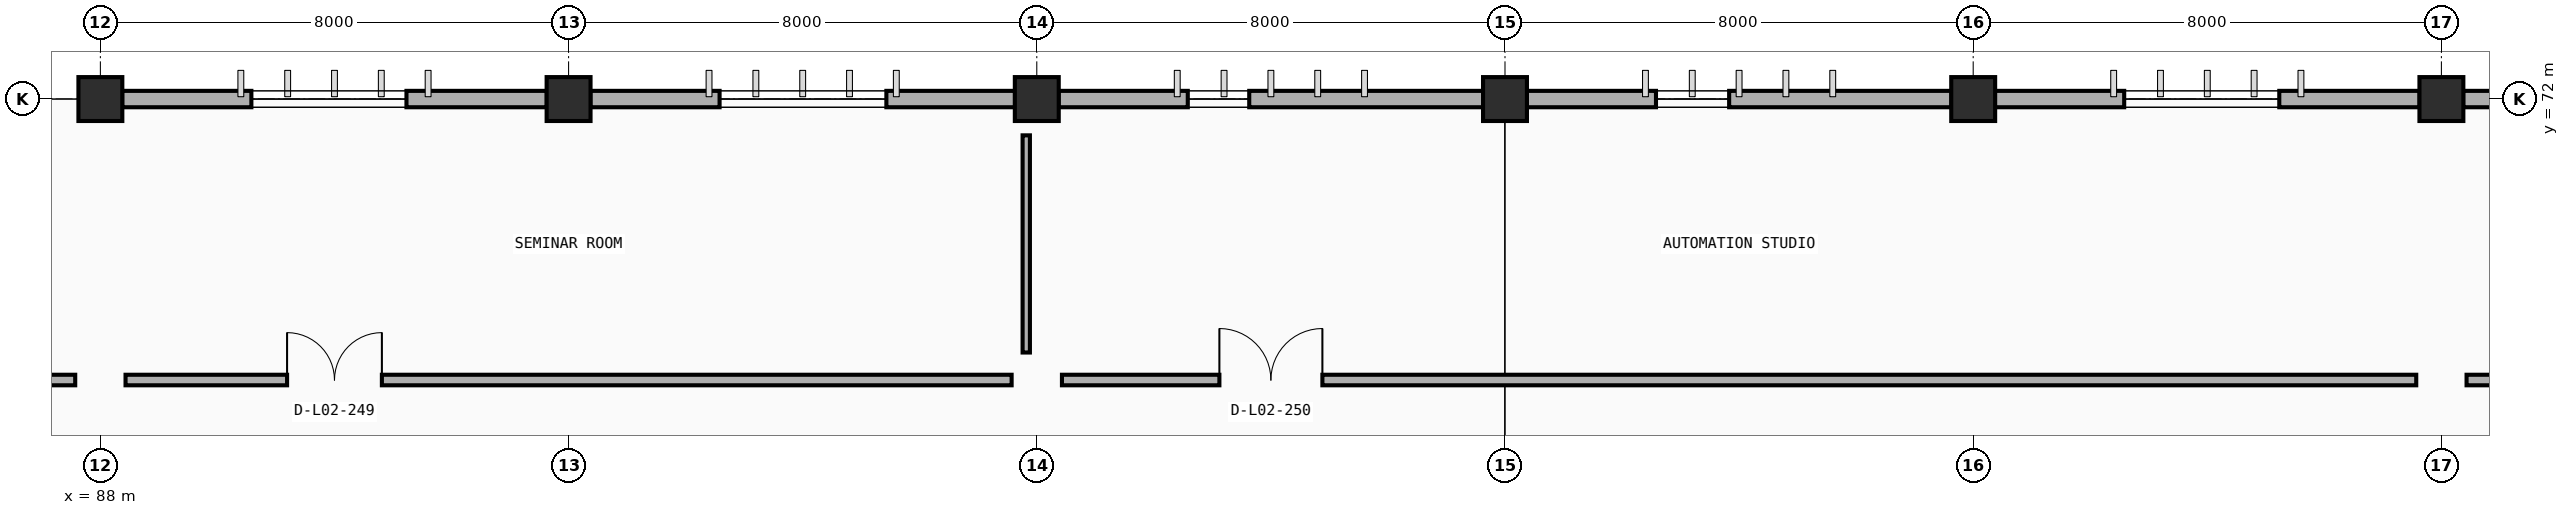
"""IFC4 building model, lengths in metres.
Left out: names, types, materials, properties, quantities, classifications, styles, units other than length and angle.
Written with IfcOpenShell. Run it as: python <this file> out.ifc"""

import sys

from ifc_helpers import new_model, si_unit, direction, frame, frame_2d, origin, origin_2d, place, context, subcontext, project, spatial, rectangle, extrude, element, fill, save


model = new_model("IFC4")
c1 = context("Model", 3, precision=1e-05, world=origin(), true_north=direction((0.0, 1.0)))
c2 = subcontext(c1, "Body", "Model", "MODEL_VIEW")
j1 = project(units=[si_unit("LENGTHUNIT", "METRE"), si_unit("PLANEANGLEUNIT", "RADIAN")], contexts=[c1])
p1 = place(None, origin())
s1 = spatial("IfcSite", under=j1, at=p1, CompositionType="ELEMENT")
p2 = place(p1, origin())
s2 = spatial("IfcBuilding", under=s1, at=p2, CompositionType="ELEMENT")
p3 = place(p2, frame((0.0, 0.0, 4.8)))
s3 = spatial("IfcBuildingStorey", under=s2, at=p3, CompositionType="ELEMENT", Elevation=4.8)
for number, where, z_axis, x_axis in (
    (1, (88.0, 72.0, 0.0), (0.0, 0.0, 1.0), (1.0, 0.0, 0.0)),
    (2, (96.0, 72.0, 0.0), (0.0, 0.0, 1.0), (1.0, 0.0, 0.0)),
    (3, (104.0, 72.0, 0.0), (0.0, 0.0, 1.0), (1.0, 0.0, 0.0)),
    (4, (112.0, 72.0, 0.0), (0.0, 0.0, 1.0), (1.0, 0.0, 0.0)),
    (5, (120.0, 72.0, 0.0), (0.0, 0.0, 1.0), (1.0, 0.0, 0.0)),
    (6, (128.0, 72.0, 0.0), (0.0, 0.0, 1.0), (1.0, 0.0, 0.0)),
):
    element("IfcColumn", number, at=place(p3, frame(where, z_axis=z_axis, x_axis=x_axis)), inside=s3, PredefinedType="COLUMN", context=c2, shape_type="SweptSolid", body=[
        extrude(rectangle(XDim=0.75, YDim=0.75, at=origin_2d()), origin(), (0.0, 0.0, 1.0), 4.8),
    ])
p4 = place(p3, frame((88.372, 72.0, 0.0), z_axis=(0.0, 0.0, 1.0), x_axis=(1.0, 0.0, 0.0)))
e7 = element("IfcWall", 7, at=p4, inside=s3, PredefinedType="STANDARD", context=c2, shape_type="SweptSolid", body=[
    extrude(rectangle(XDim=7.256, YDim=0.28, at=frame_2d((3.628, 0.0))), origin(), (0.0, 0.0, 1.0), 3.91),
])
p5 = place(p4, frame((2.208, 0.0, 0.9)))
e8 = element("IfcOpeningElement", 8, at=p5, cuts=e7, PredefinedType="OPENING", context=c2, shape_type="SweptSolid", body=[
    extrude(rectangle(XDim=2.65, YDim=1.85, at=frame_2d((1.325, 0.925))), frame((0.0, 0.15, 0.0), z_axis=(0.0, -1.0, 0.0), x_axis=(1.0, 0.0, 0.0)), (0.0, 0.0, 1.0), 0.3),
])
p6 = place(p3, frame((96.372, 72.0, 0.0), z_axis=(0.0, 0.0, 1.0), x_axis=(1.0, 0.0, 0.0)))
e9 = element("IfcWall", 9, at=p6, inside=s3, PredefinedType="STANDARD", context=c2, shape_type="SweptSolid", body=[
    extrude(rectangle(XDim=7.256, YDim=0.28, at=frame_2d((3.628, 0.0))), origin(), (0.0, 0.0, 1.0), 3.91),
])
p7 = place(p6, frame((2.208, 0.0, 0.9)))
e10 = element("IfcOpeningElement", 10, at=p7, cuts=e9, PredefinedType="OPENING", context=c2, shape_type="SweptSolid", body=[
    extrude(rectangle(XDim=2.85, YDim=1.85, at=frame_2d((1.425, 0.925))), frame((0.0, 0.15, 0.0), z_axis=(0.0, -1.0, 0.0), x_axis=(1.0, 0.0, 0.0)), (0.0, 0.0, 1.0), 0.3),
])
p8 = place(p3, frame((104.372, 72.0, 0.0), z_axis=(0.0, 0.0, 1.0), x_axis=(1.0, 0.0, 0.0)))
e11 = element("IfcWall", 11, at=p8, inside=s3, PredefinedType="STANDARD", context=c2, shape_type="SweptSolid", body=[
    extrude(rectangle(XDim=7.256, YDim=0.28, at=frame_2d((3.628, 0.0))), origin(), (0.0, 0.0, 1.0), 3.91),
])
p9 = place(p8, frame((2.208, 0.0, 0.9)))
e12 = element("IfcOpeningElement", 12, at=p9, cuts=e11, PredefinedType="OPENING", context=c2, shape_type="SweptSolid", body=[
    extrude(rectangle(XDim=1.05, YDim=2.0, at=frame_2d((0.525, 1.0))), frame((0.0, 0.15, 0.0), z_axis=(0.0, -1.0, 0.0), x_axis=(1.0, 0.0, 0.0)), (0.0, 0.0, 1.0), 0.3),
])
p10 = place(p3, frame((112.372, 72.0, 0.0), z_axis=(0.0, 0.0, 1.0), x_axis=(1.0, 0.0, 0.0)))
e13 = element("IfcWall", 13, at=p10, inside=s3, PredefinedType="STANDARD", context=c2, shape_type="SweptSolid", body=[
    extrude(rectangle(XDim=7.256, YDim=0.28, at=frame_2d((3.628, 0.0))), origin(), (0.0, 0.0, 1.0), 3.91),
])
p11 = place(p10, frame((2.208, 0.0, 0.9)))
e14 = element("IfcOpeningElement", 14, at=p11, cuts=e13, PredefinedType="OPENING", context=c2, shape_type="SweptSolid", body=[
    extrude(rectangle(XDim=1.25, YDim=2.0, at=frame_2d((0.625, 1.0))), frame((0.0, 0.15, 0.0), z_axis=(0.0, -1.0, 0.0), x_axis=(1.0, 0.0, 0.0)), (0.0, 0.0, 1.0), 0.3),
])
p12 = place(p3, frame((120.372, 72.0, 0.0), z_axis=(0.0, 0.0, 1.0), x_axis=(1.0, 0.0, 0.0)))
e15 = element("IfcWall", 15, at=p12, inside=s3, PredefinedType="STANDARD", context=c2, shape_type="SweptSolid", body=[
    extrude(rectangle(XDim=7.256, YDim=0.28, at=frame_2d((3.628, 0.0))), origin(), (0.0, 0.0, 1.0), 3.91),
])
p13 = place(p12, frame((2.208, 0.0, 0.9)))
e16 = element("IfcOpeningElement", 16, at=p13, cuts=e15, PredefinedType="OPENING", context=c2, shape_type="SweptSolid", body=[
    extrude(rectangle(XDim=2.65, YDim=1.85, at=frame_2d((1.325, 0.925))), frame((0.0, 0.15, 0.0), z_axis=(0.0, -1.0, 0.0), x_axis=(1.0, 0.0, 0.0)), (0.0, 0.0, 1.0), 0.3),
])
p14 = place(p3, frame((128.372, 72.0, 0.0), z_axis=(0.0, 0.0, 1.0), x_axis=(1.0, 0.0, 0.0)))
e17 = element("IfcWall", 17, at=p14, inside=s3, PredefinedType="STANDARD", context=c2, shape_type="SweptSolid", body=[
    extrude(rectangle(XDim=7.256, YDim=0.28, at=frame_2d((3.628, 0.0))), origin(), (0.0, 0.0, 1.0), 3.91),
])
p15 = place(p14, frame((2.208, 0.0, 0.9)))
e18 = element("IfcOpeningElement", 18, at=p15, cuts=e17, PredefinedType="OPENING", context=c2, shape_type="SweptSolid", body=[
    extrude(rectangle(XDim=2.85, YDim=1.85, at=frame_2d((1.425, 0.925))), frame((0.0, 0.15, 0.0), z_axis=(0.0, -1.0, 0.0), x_axis=(1.0, 0.0, 0.0)), (0.0, 0.0, 1.0), 0.3),
])
p16 = place(p3, frame((87.9, 72.22, 0.0), z_axis=(0.0, 0.0, 1.0), x_axis=(0.0, 1.0, 0.0)))
e19 = element("IfcWall", 19, at=p16, inside=s3, PredefinedType="PARAPET", context=c2, shape_type="SweptSolid", body=[
    extrude(rectangle(XDim=7.56, YDim=0.2, at=frame_2d((3.78, 0.0))), origin(), (0.0, 0.0, 1.0), 1.15),
])
p17 = place(p3, frame((56.43, 67.2, 0.0), z_axis=(0.0, 0.0, 1.0), x_axis=(1.0, 0.0, 0.0)))
e20 = element("IfcWall", 20, at=p17, inside=s3, PredefinedType="PARTITIONING", context=c2, shape_type="SweptSolid", body=[
    extrude(rectangle(XDim=31.14, YDim=0.18, at=frame_2d((15.57, 0.0))), origin(), (0.0, 0.0, 1.0), 3.9),
])
p18 = place(p17, frame((2.96, 0.0, 0.0)))
e21 = element("IfcOpeningElement", 21, at=p18, cuts=e20, PredefinedType="OPENING", context=c2, shape_type="SweptSolid", body=[
    extrude(rectangle(XDim=1.22, YDim=2.18, at=frame_2d((0.61, 1.09))), frame((0.0, 0.1, 0.0), z_axis=(0.0, -1.0, 0.0), x_axis=(1.0, 0.0, 0.0)), (0.0, 0.0, 1.0), 0.2),
])
p19 = place(p3, frame((88.43, 67.2, 0.0), z_axis=(0.0, 0.0, 1.0), x_axis=(1.0, 0.0, 0.0)))
e22 = element("IfcWall", 22, at=p19, inside=s3, PredefinedType="PARTITIONING", context=c2, shape_type="SweptSolid", body=[
    extrude(rectangle(XDim=15.14, YDim=0.18, at=frame_2d((7.57, 0.0))), origin(), (0.0, 0.0, 1.0), 3.9),
])
p20 = place(p19, frame((2.76, 0.0, 0.0)))
e23 = element("IfcOpeningElement", 23, at=p20, cuts=e22, PredefinedType="OPENING", context=c2, shape_type="SweptSolid", body=[
    extrude(rectangle(XDim=1.62, YDim=2.2, at=frame_2d((0.81, 1.1))), frame((0.0, 0.1, 0.0), z_axis=(0.0, -1.0, 0.0), x_axis=(1.0, 0.0, 0.0)), (0.0, 0.0, 1.0), 0.2),
])
p21 = place(p3, frame((103.82, 67.67, 0.0), z_axis=(0.0, 0.0, 1.0), x_axis=(0.0, 1.0, 0.0)))
e24 = element("IfcWall", 24, at=p21, inside=s3, PredefinedType="PARTITIONING", context=c2, shape_type="SweptSolid", body=[
    extrude(rectangle(XDim=3.71, YDim=0.125, at=frame_2d((1.855, 0.0))), origin(), (0.0, 0.0, 1.0), 3.76),
])
p22 = place(p3, frame((104.43, 67.2, 0.0), z_axis=(0.0, 0.0, 1.0), x_axis=(1.0, 0.0, 0.0)))
e25 = element("IfcWall", 25, at=p22, inside=s3, PredefinedType="PARTITIONING", context=c2, shape_type="SweptSolid", body=[
    extrude(rectangle(XDim=23.14, YDim=0.18, at=frame_2d((11.57, 0.0))), origin(), (0.0, 0.0, 1.0), 3.9),
])
p23 = place(p22, frame((2.69, 0.0, 0.0)))
e26 = element("IfcOpeningElement", 26, at=p23, cuts=e25, PredefinedType="OPENING", context=c2, shape_type="SweptSolid", body=[
    extrude(rectangle(XDim=1.76, YDim=2.25, at=frame_2d((0.88, 1.125))), frame((0.0, 0.1, 0.0), z_axis=(0.0, -1.0, 0.0), x_axis=(1.0, 0.0, 0.0)), (0.0, 0.0, 1.0), 0.2),
])
p24 = place(p3, frame((128.43, 67.2, 0.0), z_axis=(0.0, 0.0, 1.0), x_axis=(1.0, 0.0, 0.0)))
e27 = element("IfcWall", 27, at=p24, inside=s3, PredefinedType="PARTITIONING", context=c2, shape_type="SweptSolid", body=[
    extrude(rectangle(XDim=23.14, YDim=0.18, at=frame_2d((11.57, 0.0))), origin(), (0.0, 0.0, 1.0), 3.9),
])
p25 = place(p24, frame((2.74, 0.0, 0.0)))
e28 = element("IfcOpeningElement", 28, at=p25, cuts=e27, PredefinedType="OPENING", context=c2, shape_type="SweptSolid", body=[
    extrude(rectangle(XDim=1.66, YDim=2.22, at=frame_2d((0.83, 1.11))), frame((0.0, 0.1, 0.0), z_axis=(0.0, -1.0, 0.0), x_axis=(1.0, 0.0, 0.0)), (0.0, 0.0, 1.0), 0.2),
])
p26 = place(p5, origin())
e29 = element("IfcWindow", 29, at=p26, inside=s3, PartitioningType="DOUBLE_PANEL_VERTICAL", PredefinedType="WINDOW", context=c2, shape_type="SweptSolid", body=[
    extrude(rectangle(XDim=2.65, YDim=1.85, at=frame_2d((1.325, 0.925))), frame((0.0, 0.03, 0.0), z_axis=(0.0, -1.0, 0.0), x_axis=(1.0, 0.0, 0.0)), (0.0, 0.0, 1.0), 0.06),
])
fill(e8, e29)
p27 = place(p7, origin())
e30 = element("IfcWindow", 30, at=p27, inside=s3, PartitioningType="DOUBLE_PANEL_VERTICAL", PredefinedType="WINDOW", context=c2, shape_type="SweptSolid", body=[
    extrude(rectangle(XDim=2.85, YDim=1.85, at=frame_2d((1.425, 0.925))), frame((0.0, 0.03, 0.0), z_axis=(0.0, -1.0, 0.0), x_axis=(1.0, 0.0, 0.0)), (0.0, 0.0, 1.0), 0.06),
])
fill(e10, e30)
p28 = place(p9, origin())
e31 = element("IfcWindow", 31, at=p28, inside=s3, PartitioningType="SINGLE_PANEL", PredefinedType="WINDOW", context=c2, shape_type="SweptSolid", body=[
    extrude(rectangle(XDim=1.05, YDim=2.0, at=frame_2d((0.525, 1.0))), frame((0.0, 0.03, 0.0), z_axis=(0.0, -1.0, 0.0), x_axis=(1.0, 0.0, 0.0)), (0.0, 0.0, 1.0), 0.06),
])
fill(e12, e31)
p29 = place(p11, origin())
e32 = element("IfcWindow", 32, at=p29, inside=s3, PartitioningType="SINGLE_PANEL", PredefinedType="WINDOW", context=c2, shape_type="SweptSolid", body=[
    extrude(rectangle(XDim=1.25, YDim=2.0, at=frame_2d((0.625, 1.0))), frame((0.0, 0.03, 0.0), z_axis=(0.0, -1.0, 0.0), x_axis=(1.0, 0.0, 0.0)), (0.0, 0.0, 1.0), 0.06),
])
fill(e14, e32)
p30 = place(p13, origin())
e33 = element("IfcWindow", 33, at=p30, inside=s3, PartitioningType="DOUBLE_PANEL_VERTICAL", PredefinedType="WINDOW", context=c2, shape_type="SweptSolid", body=[
    extrude(rectangle(XDim=2.65, YDim=1.85, at=frame_2d((1.325, 0.925))), frame((0.0, 0.03, 0.0), z_axis=(0.0, -1.0, 0.0), x_axis=(1.0, 0.0, 0.0)), (0.0, 0.0, 1.0), 0.06),
])
fill(e16, e33)
p31 = place(p20, origin())
e34 = element("IfcDoor", 34, at=p31, inside=s3, OperationType="DOUBLE_DOOR_SINGLE_SWING", PredefinedType="DOOR", context=c2, shape_type="SweptSolid", body=[
    extrude(rectangle(XDim=1.62, YDim=2.2, at=frame_2d((0.81, 1.1))), frame((0.0, 0.025, 0.0), z_axis=(0.0, -1.0, 0.0), x_axis=(1.0, 0.0, 0.0)), (0.0, 0.0, 1.0), 0.05),
])
fill(e23, e34)
p32 = place(p23, origin())
e35 = element("IfcDoor", 35, at=p32, inside=s3, OperationType="DOUBLE_DOOR_SINGLE_SWING", PredefinedType="DOOR", context=c2, shape_type="SweptSolid", body=[
    extrude(rectangle(XDim=1.76, YDim=2.25, at=frame_2d((0.88, 1.125))), frame((0.0, 0.025, 0.0), z_axis=(0.0, -1.0, 0.0), x_axis=(1.0, 0.0, 0.0)), (0.0, 0.0, 1.0), 0.05),
])
fill(e26, e35)
save(model, sys.argv[1])
